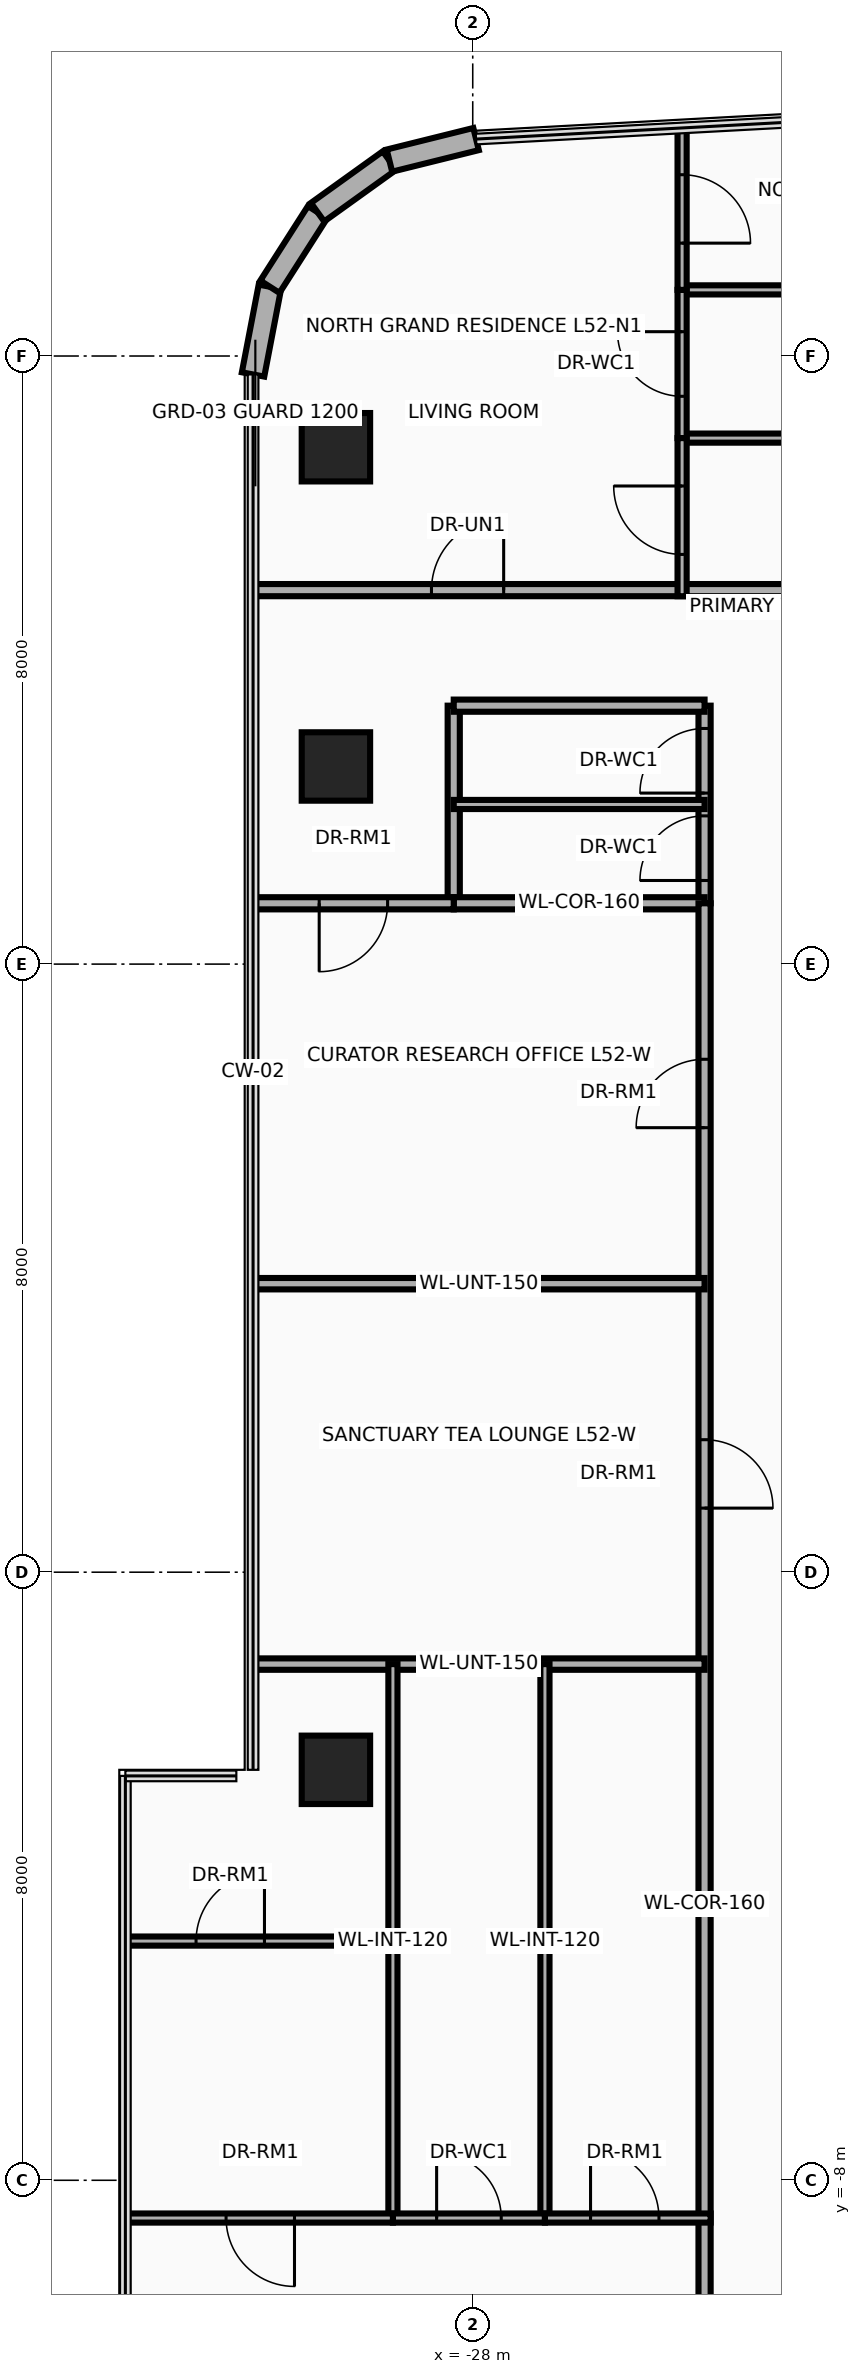
"""IFC4 building model, lengths in metres.
Left out: names, types, materials, properties, quantities, classifications, styles, units other than length and angle.
Written with IfcOpenShell. Run it as: python <this file> out.ifc"""

import sys

from ifc_helpers import new_model, si_unit, direction, frame, frame_2d, origin, origin_2d, place, context, subcontext, project, spatial, rectangle, extrude, source, transform, mapped, element, fill, save


model = new_model("IFC4")
c1 = context("Model", 3, precision=1e-05, world=origin(), true_north=direction((0.0, 1.0)))
c2 = subcontext(c1, "Body", "Model", "MODEL_VIEW")
j1 = project(units=[si_unit("LENGTHUNIT", "METRE"), si_unit("PLANEANGLEUNIT", "RADIAN")], contexts=[c1])
p1 = place(None, origin())
s1 = spatial("IfcSite", under=j1, at=p1, CompositionType="ELEMENT")
p2 = place(p1, origin())
s2 = spatial("IfcBuilding", under=s1, at=p2, CompositionType="ELEMENT")
p3 = place(p2, frame((0.0, 0.0, 205.5)))
s3 = spatial("IfcBuildingStorey", under=s2, at=p3, CompositionType="ELEMENT", Elevation=205.5)
m1 = source(origin(), c2, "Body", "SweptSolid", [
    extrude(rectangle(XDim=0.9, YDim=0.9, at=origin_2d()), origin(), (0.0, 0.0, 1.0), 3.5),
])
for number, where, z_axis, x_axis in (
    (1, (-29.8, -2.6, 0.0), (0.0, 0.0, 1.0), (1.0, 0.0, 0.0)),
    (2, (-29.8, 10.6, 0.0), (0.0, 0.0, 1.0), (1.0, 0.0, 0.0)),
    (3, (-29.8, 14.8, 0.0), (0.0, 0.0, 1.0), (1.0, 0.0, 0.0)),
):
    element("IfcColumn", number, at=place(p3, frame(where, z_axis=z_axis, x_axis=x_axis)), inside=s3, PredefinedType="COLUMN", context=c2, shape_type="MappedRepresentation", body=[
        mapped(m1, transform((0.0, 0.0, 0.0), x_axis=(1.0, 0.0, 0.0), y_axis=(0.0, 1.0, 0.0), z_axis=(0.0, 0.0, 1.0), scale=1.0)),
    ])
p4 = place(p3, frame((-30.89, 15.758, 0.0), z_axis=(0.0, 0.0, 1.0), x_axis=(0.18831542659, 0.982108598938, 0.0)))
e4 = element("IfcWall", 4, at=p4, inside=s3, PredefinedType="SOLIDWALL", context=c2, shape_type="SweptSolid", body=[
    extrude(rectangle(XDim=1.175, YDim=0.3, at=frame_2d((0.587, 0.0))), origin(), (0.0, 0.0, 1.0), 3.26),
])
p5 = place(p3, frame((-30.669, 16.911, 0.0), z_axis=(0.0, 0.0, 1.0), x_axis=(0.538678781902, 0.84251122837, 0.0)))
e5 = element("IfcWall", 5, at=p5, inside=s3, PredefinedType="SOLIDWALL", context=c2, shape_type="SweptSolid", body=[
    extrude(rectangle(XDim=1.164, YDim=0.3, at=frame_2d((0.582, 0.0))), origin(), (0.0, 0.0, 1.0), 3.26),
])
p6 = place(p3, frame((-30.042, 17.892, 0.0), z_axis=(0.0, 0.0, 1.0), x_axis=(0.812313539683, 0.583220981487, 0.0)))
e6 = element("IfcWall", 6, at=p6, inside=s3, PredefinedType="SOLIDWALL", context=c2, shape_type="SweptSolid", body=[
    extrude(rectangle(XDim=1.164, YDim=0.3, at=frame_2d((0.582, 0.0))), origin(), (0.0, 0.0, 1.0), 3.26),
])
p7 = place(p3, frame((-29.096, 18.571, 0.0), z_axis=(0.0, 0.0, 1.0), x_axis=(0.97050812798, 0.241068400098, 0.0)))
e7 = element("IfcWall", 7, at=p7, inside=s3, PredefinedType="SOLIDWALL", context=c2, shape_type="SweptSolid", body=[
    extrude(rectangle(XDim=1.175, YDim=0.3, at=frame_2d((0.587, 0.0))), origin(), (0.0, 0.0, 1.0), 3.26),
])
p8 = place(p3, frame((-28.25, 8.8, 0.0), z_axis=(0.0, 0.0, 1.0), x_axis=(0.0, 1.0, 0.0)))
e8 = element("IfcWall", 8, at=p8, inside=s3, PredefinedType="PARTITIONING", context=c2, shape_type="SweptSolid", body=[
    extrude(rectangle(XDim=2.6, YDim=0.16, at=frame_2d((1.3, 0.0))), origin(), (0.0, 0.0, 1.0), 2.544),
])
p9 = place(p3, frame((-24.95, 8.8, 0.0), z_axis=(0.0, 0.0, 1.0), x_axis=(0.0, 1.0, 0.0)))
e9 = element("IfcWall", 9, at=p9, inside=s3, PredefinedType="PARTITIONING", context=c2, shape_type="SweptSolid", body=[
    extrude(rectangle(XDim=2.6, YDim=0.16, at=frame_2d((1.3, 0.0))), origin(), (0.0, 0.0, 1.0), 2.544),
])
p10 = place(p9, frame((0.3, 0.0, 0.0)))
e10 = element("IfcOpeningElement", 10, at=p10, cuts=e9, PredefinedType="OPENING", context=c2, shape_type="SweptSolid", body=[
    extrude(rectangle(XDim=0.85, YDim=2.1, at=frame_2d((0.425, 1.05))), frame((0.0, 0.095, 0.0), z_axis=(0.0, -1.0, 0.0), x_axis=(1.0, 0.0, 0.0)), (0.0, 0.0, 1.0), 0.19),
])
p11 = place(p9, frame((1.45, 0.0, 0.0)))
e11 = element("IfcOpeningElement", 11, at=p11, cuts=e9, PredefinedType="OPENING", context=c2, shape_type="SweptSolid", body=[
    extrude(rectangle(XDim=0.85, YDim=2.1, at=frame_2d((0.425, 1.05))), frame((0.0, 0.095, 0.0), z_axis=(0.0, -1.0, 0.0), x_axis=(1.0, 0.0, 0.0)), (0.0, 0.0, 1.0), 0.19),
])
for number, where, z_axis, x_axis in (
    (12, (-28.25, 8.8, 0.0), (0.0, 0.0, 1.0), (1.0, 0.0, 0.0)),
    (13, (-28.25, 11.4, 0.0), (0.0, 0.0, 1.0), (1.0, 0.0, 0.0)),
):
    element("IfcWall", number, at=place(p3, frame(where, z_axis=z_axis, x_axis=x_axis)), inside=s3, PredefinedType="PARTITIONING", context=c2, shape_type="SweptSolid", body=[
        extrude(rectangle(XDim=3.3, YDim=0.16, at=frame_2d((1.65, 0.0))), origin(), (0.0, 0.0, 1.0), 3.26),
    ])
p12 = place(p3, frame((-28.25, 10.1, 0.0), z_axis=(0.0, 0.0, 1.0), x_axis=(1.0, 0.0, 0.0)))
e14 = element("IfcWall", 14, at=p12, inside=s3, PredefinedType="PARTITIONING", context=c2, shape_type="SweptSolid", body=[
    extrude(rectangle(XDim=3.3, YDim=0.12, at=frame_2d((1.65, 0.0))), origin(), (0.0, 0.0, 1.0), 3.26),
])
p13 = place(p3, frame((-24.95, -17.54, 0.0), z_axis=(0.0, 0.0, 1.0), x_axis=(0.0, 1.0, 0.0)))
e15 = element("IfcWall", 15, at=p13, inside=s3, PredefinedType="PARTITIONING", context=c2, shape_type="SweptSolid", body=[
    extrude(rectangle(XDim=26.34, YDim=0.16, at=frame_2d((13.17, 0.0))), origin(), (0.0, 0.0, 1.0), 2.544),
])
p14 = place(p13, frame((4.122, 0.0, 0.0)))
e16 = element("IfcOpeningElement", 16, at=p14, cuts=e15, PredefinedType="OPENING", context=c2, shape_type="SweptSolid", body=[
    extrude(rectangle(XDim=0.95, YDim=2.15, at=frame_2d((0.475, 1.075))), frame((0.0, 0.095, 0.0), z_axis=(0.0, -1.0, 0.0), x_axis=(1.0, 0.0, 0.0)), (0.0, 0.0, 1.0), 0.19),
])
p15 = place(p13, frame((18.383, 0.0, 0.0)))
e17 = element("IfcOpeningElement", 17, at=p15, cuts=e15, PredefinedType="OPENING", context=c2, shape_type="SweptSolid", body=[
    extrude(rectangle(XDim=0.9, YDim=2.1, at=frame_2d((0.45, 1.05))), frame((0.0, 0.095, 0.0), z_axis=(0.0, -1.0, 0.0), x_axis=(1.0, 0.0, 0.0)), (0.0, 0.0, 1.0), 0.19),
])
p16 = place(p13, frame((23.388, 0.0, 0.0)))
e18 = element("IfcOpeningElement", 18, at=p16, cuts=e15, PredefinedType="OPENING", context=c2, shape_type="SweptSolid", body=[
    extrude(rectangle(XDim=0.9, YDim=2.1, at=frame_2d((0.45, 1.05))), frame((0.0, 0.095, 0.0), z_axis=(0.0, -1.0, 0.0), x_axis=(1.0, 0.0, 0.0)), (0.0, 0.0, 1.0), 0.19),
])
p17 = place(p3, frame((-30.89, 8.8, 0.0), z_axis=(0.0, 0.0, 1.0), x_axis=(1.0, 0.0, 0.0)))
e19 = element("IfcWall", 19, at=p17, inside=s3, PredefinedType="PARTITIONING", context=c2, shape_type="SweptSolid", body=[
    extrude(rectangle(XDim=2.64, YDim=0.16, at=frame_2d((1.32, 0.0))), origin(), (0.0, 0.0, 1.0), 2.706),
])
p18 = place(p17, frame((0.87, 0.0, 0.0)))
e20 = element("IfcOpeningElement", 20, at=p18, cuts=e19, PredefinedType="OPENING", context=c2, shape_type="SweptSolid", body=[
    extrude(rectangle(XDim=0.9, YDim=2.1, at=frame_2d((0.45, 1.05))), frame((0.0, 0.095, 0.0), z_axis=(0.0, -1.0, 0.0), x_axis=(1.0, 0.0, 0.0)), (0.0, 0.0, 1.0), 0.19),
])
p19 = place(p3, frame((-30.89, -1.209, 0.0), z_axis=(0.0, 0.0, 1.0), x_axis=(1.0, 0.0, 0.0)))
e21 = element("IfcWall", 21, at=p19, inside=s3, PredefinedType="PARTITIONING", context=c2, shape_type="SweptSolid", body=[
    extrude(rectangle(XDim=5.94, YDim=0.15, at=frame_2d((2.97, 0.0))), origin(), (0.0, 0.0, 1.0), 2.706),
])
for number, where, z_axis, x_axis in (
    (22, (-27.05, -8.497, 0.0), (0.0, 0.0, 1.0), (0.0, 1.0, 0.0)),
    (23, (-29.05, -8.497, 0.0), (0.0, 0.0, 1.0), (0.0, 1.0, 0.0)),
):
    element("IfcWall", number, at=place(p3, frame(where, z_axis=z_axis, x_axis=x_axis)), inside=s3, PredefinedType="PARTITIONING", context=c2, shape_type="SweptSolid", body=[
        extrude(rectangle(XDim=7.288, YDim=0.12, at=frame_2d((3.644, 0.0))), origin(), (0.0, 0.0, 1.0), 2.544),
    ])
p20 = place(p3, frame((-29.05, -8.497, 0.0), z_axis=(0.0, 0.0, 1.0), x_axis=(1.0, 0.0, 0.0)))
e24 = element("IfcWall", 24, at=p20, inside=s3, PredefinedType="PARTITIONING", context=c2, shape_type="SweptSolid", body=[
    extrude(rectangle(XDim=2.0, YDim=0.12, at=frame_2d((1.0, 0.0))), origin(), (0.0, 0.0, 1.0), 2.788),
])
p21 = place(p20, frame((0.575, 0.0, 0.0)))
e25 = element("IfcOpeningElement", 25, at=p21, cuts=e24, PredefinedType="OPENING", context=c2, shape_type="SweptSolid", body=[
    extrude(rectangle(XDim=0.85, YDim=2.1, at=frame_2d((0.425, 1.05))), frame((0.0, 0.075, 0.0), z_axis=(0.0, -1.0, 0.0), x_axis=(1.0, 0.0, 0.0)), (0.0, 0.0, 1.0), 0.15),
])
p22 = place(p3, frame((-27.05, -8.497, 0.0), z_axis=(0.0, 0.0, 1.0), x_axis=(1.0, 0.0, 0.0)))
e26 = element("IfcWall", 26, at=p22, inside=s3, PredefinedType="PARTITIONING", context=c2, shape_type="SweptSolid", body=[
    extrude(rectangle(XDim=2.18, YDim=0.12, at=frame_2d((1.09, 0.0))), origin(), (0.0, 0.0, 1.0), 2.788),
])
p23 = place(p22, frame((0.6, 0.0, 0.0)))
e27 = element("IfcOpeningElement", 27, at=p23, cuts=e26, PredefinedType="OPENING", context=c2, shape_type="SweptSolid", body=[
    extrude(rectangle(XDim=0.9, YDim=2.1, at=frame_2d((0.45, 1.05))), frame((0.0, 0.075, 0.0), z_axis=(0.0, -1.0, 0.0), x_axis=(1.0, 0.0, 0.0)), (0.0, 0.0, 1.0), 0.15),
])
p24 = place(p3, frame((-32.54, -8.497, 0.0), z_axis=(0.0, 0.0, 1.0), x_axis=(1.0, 0.0, 0.0)))
e28 = element("IfcWall", 28, at=p24, inside=s3, PredefinedType="PARTITIONING", context=c2, shape_type="SweptSolid", body=[
    extrude(rectangle(XDim=3.49, YDim=0.12, at=frame_2d((1.745, 0.0))), origin(), (0.0, 0.0, 1.0), 2.706),
])
p25 = place(p24, frame((1.295, 0.0, 0.0)))
e29 = element("IfcOpeningElement", 29, at=p25, cuts=e28, PredefinedType="OPENING", context=c2, shape_type="SweptSolid", body=[
    extrude(rectangle(XDim=0.9, YDim=2.1, at=frame_2d((0.45, 1.05))), frame((0.0, 0.075, 0.0), z_axis=(0.0, -1.0, 0.0), x_axis=(1.0, 0.0, 0.0)), (0.0, 0.0, 1.0), 0.15),
])
p26 = place(p3, frame((-32.54, -4.853, 0.0), z_axis=(0.0, 0.0, 1.0), x_axis=(1.0, 0.0, 0.0)))
e30 = element("IfcWall", 30, at=p26, inside=s3, PredefinedType="PARTITIONING", context=c2, shape_type="SweptSolid", body=[
    extrude(rectangle(XDim=3.49, YDim=0.12, at=frame_2d((1.745, 0.0))), origin(), (0.0, 0.0, 1.0), 2.706),
])
p27 = place(p26, frame((0.9, 0.0, 0.0)))
e31 = element("IfcOpeningElement", 31, at=p27, cuts=e30, PredefinedType="OPENING", context=c2, shape_type="SweptSolid", body=[
    extrude(rectangle(XDim=0.9, YDim=2.1, at=frame_2d((0.45, 1.05))), frame((0.0, 0.075, 0.0), z_axis=(0.0, -1.0, 0.0), x_axis=(1.0, 0.0, 0.0)), (0.0, 0.0, 1.0), 0.15),
])
p28 = place(p3, frame((-30.89, 3.795, 0.0), z_axis=(0.0, 0.0, 1.0), x_axis=(1.0, 0.0, 0.0)))
e32 = element("IfcWall", 32, at=p28, inside=s3, PredefinedType="PARTITIONING", context=c2, shape_type="SweptSolid", body=[
    extrude(rectangle(XDim=5.94, YDim=0.15, at=frame_2d((2.97, 0.0))), origin(), (0.0, 0.0, 1.0), 2.706),
])
p29 = place(p3, frame((-30.89, 12.92, 0.0), z_axis=(0.0, 0.0, 1.0), x_axis=(1.0, 0.0, 0.0)))
e33 = element("IfcWall", 33, at=p29, inside=s3, PredefinedType="PARTITIONING", context=c2, shape_type="SweptSolid", body=[
    extrude(rectangle(XDim=31.28, YDim=0.16, at=frame_2d((15.64, 0.0))), origin(), (0.0, 0.0, 1.0), 2.634),
])
p30 = place(p29, frame((2.347, 0.0, 0.0)))
e34 = element("IfcOpeningElement", 34, at=p30, cuts=e33, PredefinedType="OPENING", context=c2, shape_type="SweptSolid", body=[
    extrude(rectangle(XDim=0.95, YDim=2.15, at=frame_2d((0.475, 1.075))), frame((0.0, 0.095, 0.0), z_axis=(0.0, -1.0, 0.0), x_axis=(1.0, 0.0, 0.0)), (0.0, 0.0, 1.0), 0.19),
])
p31 = place(p29, frame((22.56, 0.0, 0.0)))
e35 = element("IfcOpeningElement", 35, at=p31, cuts=e33, PredefinedType="OPENING", context=c2, shape_type="SweptSolid", body=[
    extrude(rectangle(XDim=1.8, YDim=2.15, at=frame_2d((0.9, 1.075))), frame((0.0, 0.095, 0.0), z_axis=(0.0, -1.0, 0.0), x_axis=(1.0, 0.0, 0.0)), (0.0, 0.0, 1.0), 0.19),
])
p32 = place(p3, frame((-25.246, 14.92, 0.0), z_axis=(0.0, 0.0, 1.0), x_axis=(1.0, 0.0, 0.0)))
e36 = element("IfcWall", 36, at=p32, inside=s3, PredefinedType="PARTITIONING", context=c2, shape_type="SweptSolid", body=[
    extrude(rectangle(XDim=9.996, YDim=0.12, at=frame_2d((4.998, 0.0))), origin(), (0.0, 0.0, 1.0), 2.544),
])
p33 = place(p3, frame((-25.246, 16.87, 0.0), z_axis=(0.0, 0.0, 1.0), x_axis=(1.0, 0.0, 0.0)))
e37 = element("IfcWall", 37, at=p33, inside=s3, PredefinedType="PARTITIONING", context=c2, shape_type="SweptSolid", body=[
    extrude(rectangle(XDim=9.996, YDim=0.12, at=frame_2d((4.998, 0.0))), origin(), (0.0, 0.0, 1.0), 3.26),
])
p34 = place(p3, frame((-25.246, 14.92, 0.0), z_axis=(0.0, 0.0, 1.0), x_axis=(0.0, 1.0, 0.0)))
e38 = element("IfcWall", 38, at=p34, inside=s3, PredefinedType="PARTITIONING", context=c2, shape_type="SweptSolid", body=[
    extrude(rectangle(XDim=1.95, YDim=0.12, at=frame_2d((0.975, 0.0))), origin(), (0.0, 0.0, 1.0), 2.544),
])
p35 = place(p34, frame((0.55, 0.0, 0.0)))
e39 = element("IfcOpeningElement", 39, at=p35, cuts=e38, PredefinedType="OPENING", context=c2, shape_type="SweptSolid", body=[
    extrude(rectangle(XDim=0.85, YDim=2.1, at=frame_2d((0.425, 1.05))), frame((0.0, 0.075, 0.0), z_axis=(0.0, -1.0, 0.0), x_axis=(1.0, 0.0, 0.0)), (0.0, 0.0, 1.0), 0.15),
])
p36 = place(p3, frame((-25.246, 12.84, 0.0), z_axis=(0.0, 0.0, 1.0), x_axis=(0.0, 1.0, 0.0)))
e40 = element("IfcWall", 40, at=p36, inside=s3, PredefinedType="PARTITIONING", context=c2, shape_type="SweptSolid", body=[
    extrude(rectangle(XDim=2.08, YDim=0.12, at=frame_2d((1.04, 0.0))), origin(), (0.0, 0.0, 1.0), 2.544),
])
p37 = place(p36, frame((0.55, 0.0, 0.0)))
e41 = element("IfcOpeningElement", 41, at=p37, cuts=e40, PredefinedType="OPENING", context=c2, shape_type="SweptSolid", body=[
    extrude(rectangle(XDim=0.9, YDim=2.1, at=frame_2d((0.45, 1.05))), frame((0.0, 0.075, 0.0), z_axis=(0.0, -1.0, 0.0), x_axis=(1.0, 0.0, 0.0)), (0.0, 0.0, 1.0), 0.15),
])
p38 = place(p3, frame((-25.246, 16.87, 0.0), z_axis=(0.0, 0.0, 1.0), x_axis=(0.0, 1.0, 0.0)))
e42 = element("IfcWall", 42, at=p38, inside=s3, PredefinedType="PARTITIONING", context=c2, shape_type="SweptSolid", body=[
    extrude(rectangle(XDim=2.13, YDim=0.12, at=frame_2d((1.065, 0.0))), origin(), (0.0, 0.0, 1.0), 3.26),
])
p39 = place(p38, frame((0.615, 0.0, 0.0)))
e43 = element("IfcOpeningElement", 43, at=p39, cuts=e42, PredefinedType="OPENING", context=c2, shape_type="SweptSolid", body=[
    extrude(rectangle(XDim=0.9, YDim=2.1, at=frame_2d((0.45, 1.05))), frame((0.0, 0.075, 0.0), z_axis=(0.0, -1.0, 0.0), x_axis=(1.0, 0.0, 0.0)), (0.0, 0.0, 1.0), 0.15),
])
p40 = place(p10, origin())
e44 = element("IfcDoor", 44, at=p40, inside=s3, OperationType="SINGLE_SWING_LEFT", PredefinedType="DOOR", context=c2, shape_type="SweptSolid", body=[
    extrude(rectangle(XDim=0.85, YDim=2.1, at=frame_2d((0.425, 1.05))), frame((0.0, 0.025, 0.0), z_axis=(0.0, -1.0, 0.0), x_axis=(1.0, 0.0, 0.0)), (0.0, 0.0, 1.0), 0.05),
])
fill(e10, e44)
p41 = place(p11, origin())
e45 = element("IfcDoor", 45, at=p41, inside=s3, OperationType="SINGLE_SWING_RIGHT", PredefinedType="DOOR", context=c2, shape_type="SweptSolid", body=[
    extrude(rectangle(XDim=0.85, YDim=2.1, at=frame_2d((0.425, 1.05))), frame((0.0, 0.025, 0.0), z_axis=(0.0, -1.0, 0.0), x_axis=(1.0, 0.0, 0.0)), (0.0, 0.0, 1.0), 0.05),
])
fill(e11, e45)
p42 = place(p18, frame((0.9, 0.0, 0.0), z_axis=(0.0, 0.0, 1.0), x_axis=(-1.0, 0.0, 0.0)))
e46 = element("IfcDoor", 46, at=p42, inside=s3, OperationType="SINGLE_SWING_LEFT", PredefinedType="DOOR", context=c2, shape_type="SweptSolid", body=[
    extrude(rectangle(XDim=0.9, YDim=2.1, at=frame_2d((0.45, 1.05))), frame((0.0, 0.025, 0.0), z_axis=(0.0, -1.0, 0.0), x_axis=(1.0, 0.0, 0.0)), (0.0, 0.0, 1.0), 0.05),
])
fill(e20, e46)
p43 = place(p21, origin())
e47 = element("IfcDoor", 47, at=p43, inside=s3, OperationType="SINGLE_SWING_LEFT", PredefinedType="DOOR", context=c2, shape_type="SweptSolid", body=[
    extrude(rectangle(XDim=0.85, YDim=2.1, at=frame_2d((0.425, 1.05))), frame((0.0, 0.025, 0.0), z_axis=(0.0, -1.0, 0.0), x_axis=(1.0, 0.0, 0.0)), (0.0, 0.0, 1.0), 0.05),
])
fill(e25, e47)
p44 = place(p23, origin())
e48 = element("IfcDoor", 48, at=p44, inside=s3, OperationType="SINGLE_SWING_RIGHT", PredefinedType="DOOR", context=c2, shape_type="SweptSolid", body=[
    extrude(rectangle(XDim=0.9, YDim=2.1, at=frame_2d((0.45, 1.05))), frame((0.0, 0.025, 0.0), z_axis=(0.0, -1.0, 0.0), x_axis=(1.0, 0.0, 0.0)), (0.0, 0.0, 1.0), 0.05),
])
fill(e27, e48)
p45 = place(p25, frame((0.9, 0.0, 0.0), z_axis=(0.0, 0.0, 1.0), x_axis=(-1.0, 0.0, 0.0)))
e49 = element("IfcDoor", 49, at=p45, inside=s3, OperationType="SINGLE_SWING_LEFT", PredefinedType="DOOR", context=c2, shape_type="SweptSolid", body=[
    extrude(rectangle(XDim=0.9, YDim=2.1, at=frame_2d((0.45, 1.05))), frame((0.0, 0.025, 0.0), z_axis=(0.0, -1.0, 0.0), x_axis=(1.0, 0.0, 0.0)), (0.0, 0.0, 1.0), 0.05),
])
fill(e29, e49)
p46 = place(p27, origin())
e50 = element("IfcDoor", 50, at=p46, inside=s3, OperationType="SINGLE_SWING_RIGHT", PredefinedType="DOOR", context=c2, shape_type="SweptSolid", body=[
    extrude(rectangle(XDim=0.9, YDim=2.1, at=frame_2d((0.45, 1.05))), frame((0.0, 0.025, 0.0), z_axis=(0.0, -1.0, 0.0), x_axis=(1.0, 0.0, 0.0)), (0.0, 0.0, 1.0), 0.05),
])
fill(e31, e50)
p47 = place(p15, frame((0.9, 0.0, 0.0), z_axis=(0.0, 0.0, 1.0), x_axis=(-1.0, 0.0, 0.0)))
e51 = element("IfcDoor", 51, at=p47, inside=s3, OperationType="SINGLE_SWING_LEFT", PredefinedType="DOOR", context=c2, shape_type="SweptSolid", body=[
    extrude(rectangle(XDim=0.9, YDim=2.1, at=frame_2d((0.45, 1.05))), frame((0.0, 0.025, 0.0), z_axis=(0.0, -1.0, 0.0), x_axis=(1.0, 0.0, 0.0)), (0.0, 0.0, 1.0), 0.05),
])
fill(e17, e51)
p48 = place(p16, origin())
e52 = element("IfcDoor", 52, at=p48, inside=s3, OperationType="SINGLE_SWING_RIGHT", PredefinedType="DOOR", context=c2, shape_type="SweptSolid", body=[
    extrude(rectangle(XDim=0.9, YDim=2.1, at=frame_2d((0.45, 1.05))), frame((0.0, 0.025, 0.0), z_axis=(0.0, -1.0, 0.0), x_axis=(1.0, 0.0, 0.0)), (0.0, 0.0, 1.0), 0.05),
])
fill(e18, e52)
p49 = place(p30, origin())
e53 = element("IfcDoor", 53, at=p49, inside=s3, OperationType="SINGLE_SWING_RIGHT", PredefinedType="DOOR", context=c2, shape_type="SweptSolid", body=[
    extrude(rectangle(XDim=0.95, YDim=2.15, at=frame_2d((0.475, 1.075))), frame((0.0, 0.025, 0.0), z_axis=(0.0, -1.0, 0.0), x_axis=(1.0, 0.0, 0.0)), (0.0, 0.0, 1.0), 0.05),
])
fill(e34, e53)
p50 = place(p35, origin())
e54 = element("IfcDoor", 54, at=p50, inside=s3, OperationType="SINGLE_SWING_LEFT", PredefinedType="DOOR", context=c2, shape_type="SweptSolid", body=[
    extrude(rectangle(XDim=0.85, YDim=2.1, at=frame_2d((0.425, 1.05))), frame((0.0, 0.025, 0.0), z_axis=(0.0, -1.0, 0.0), x_axis=(1.0, 0.0, 0.0)), (0.0, 0.0, 1.0), 0.05),
])
fill(e39, e54)
p51 = place(p37, origin())
e55 = element("IfcDoor", 55, at=p51, inside=s3, OperationType="SINGLE_SWING_RIGHT", PredefinedType="DOOR", context=c2, shape_type="SweptSolid", body=[
    extrude(rectangle(XDim=0.9, YDim=2.1, at=frame_2d((0.45, 1.05))), frame((0.0, 0.025, 0.0), z_axis=(0.0, -1.0, 0.0), x_axis=(1.0, 0.0, 0.0)), (0.0, 0.0, 1.0), 0.05),
])
fill(e41, e55)
p52 = place(p39, frame((0.9, 0.0, 0.0), z_axis=(0.0, 0.0, 1.0), x_axis=(-1.0, 0.0, 0.0)))
e56 = element("IfcDoor", 56, at=p52, inside=s3, OperationType="SINGLE_SWING_LEFT", PredefinedType="DOOR", context=c2, shape_type="SweptSolid", body=[
    extrude(rectangle(XDim=0.9, YDim=2.1, at=frame_2d((0.45, 1.05))), frame((0.0, 0.025, 0.0), z_axis=(0.0, -1.0, 0.0), x_axis=(1.0, 0.0, 0.0)), (0.0, 0.0, 1.0), 0.05),
])
fill(e43, e56)
save(model, sys.argv[1])
